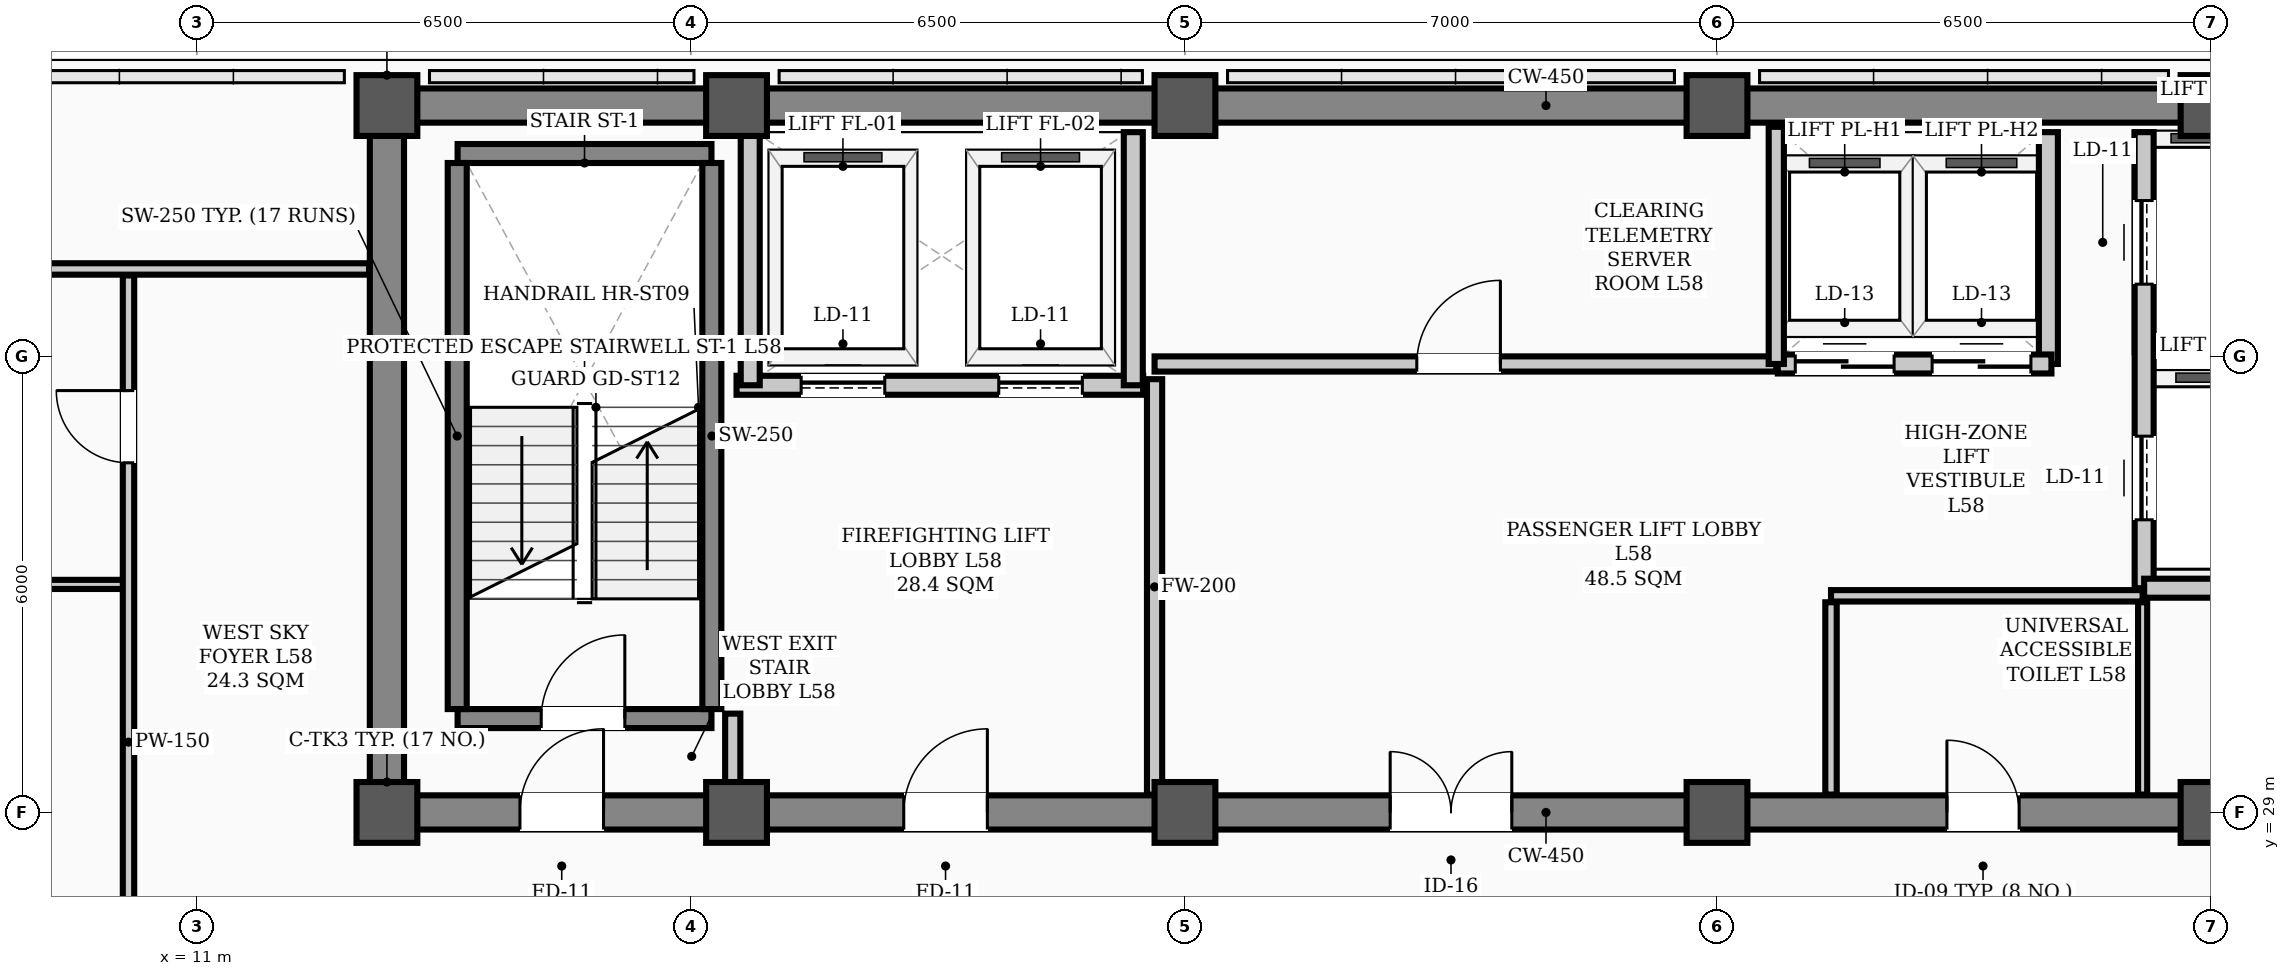
"""IFC4 building model, lengths in metres.
Left out: names, types, materials, properties, quantities, classifications, styles, units other than length and angle.
Written with IfcOpenShell. Run it as: python <this file> out.ifc"""

import sys

from ifc_helpers import new_model, si_unit, direction, frame, frame_2d, origin, origin_2d, place, context, subcontext, project, spatial, rectangle, hollow_rectangle, extrude, element, fill, save


model = new_model("IFC4")
c1 = context("Model", 3, precision=1e-05, world=origin(), true_north=direction((0.0, 1.0)))
c2 = subcontext(c1, "Body", "Model", "MODEL_VIEW")
j1 = project(units=[si_unit("LENGTHUNIT", "METRE"), si_unit("PLANEANGLEUNIT", "RADIAN")], contexts=[c1])
p1 = place(None, origin())
s1 = spatial("IfcSite", under=j1, at=p1, CompositionType="ELEMENT")
p2 = place(p1, origin())
s2 = spatial("IfcBuilding", under=s1, at=p2, CompositionType="ELEMENT")
p3 = place(p2, frame((0.0, 0.0, 234.5)))
s3 = spatial("IfcBuildingStorey", under=s2, at=p3, CompositionType="ELEMENT", Elevation=234.5)
for number, where, z_axis, x_axis in (
    (1, (13.5, 29.0, 0.0), (0.0, 0.0, 1.0), (1.0, 0.0, 0.0)),
    (2, (13.5, 38.3, 0.0), (0.0, 0.0, 1.0), (1.0, 0.0, 0.0)),
    (3, (18.1, 29.0, 0.0), (0.0, 0.0, 1.0), (1.0, 0.0, 0.0)),
    (4, (18.1, 38.3, 0.0), (0.0, 0.0, 1.0), (1.0, 0.0, 0.0)),
    (5, (24.0, 29.0, 0.0), (0.0, 0.0, 1.0), (1.0, 0.0, 0.0)),
    (6, (24.0, 38.3, 0.0), (0.0, 0.0, 1.0), (1.0, 0.0, 0.0)),
    (7, (31.0, 29.0, 0.0), (0.0, 0.0, 1.0), (1.0, 0.0, 0.0)),
    (8, (31.0, 38.3, 0.0), (0.0, 0.0, 1.0), (1.0, 0.0, 0.0)),
    (9, (37.5, 29.0, 0.0), (0.0, 0.0, 1.0), (1.0, 0.0, 0.0)),
    (10, (37.5, 38.3, 0.0), (0.0, 0.0, 1.0), (1.0, 0.0, 0.0)),
):
    element("IfcColumn", number, at=place(p3, frame(where, z_axis=z_axis, x_axis=x_axis)), inside=s3, PredefinedType="COLUMN", context=c2, shape_type="SweptSolid", body=[
        extrude(hollow_rectangle(XDim=0.8, YDim=0.8, WallThickness=0.032, InnerFilletRadius=0.016, OuterFilletRadius=0.048, at=origin_2d()), origin(), (0.0, 0.0, 1.0), 3.9),
    ])
p4 = place(p3, frame((13.5, 29.0, 0.0), z_axis=(0.0, 0.0, 1.0), x_axis=(1.0, 0.0, 0.0)))
e11 = element("IfcWall", 11, at=p4, inside=s3, PredefinedType="SHEAR", context=c2, shape_type="SweptSolid", body=[
    extrude(rectangle(XDim=30.5, YDim=0.45, at=frame_2d((15.25, 0.0))), origin(), (0.0, 0.0, 1.0), 3.72),
])
p5 = place(p4, frame((1.75, 0.0, 0.0)))
e12 = element("IfcOpeningElement", 12, at=p5, cuts=e11, PredefinedType="OPENING", context=c2, shape_type="SweptSolid", body=[
    extrude(rectangle(XDim=1.1, YDim=2.08, at=frame_2d((0.55, 1.04))), frame((0.0, 0.235, 0.0), z_axis=(0.0, -1.0, 0.0), x_axis=(1.0, 0.0, 0.0)), (0.0, 0.0, 1.0), 0.47),
])
p6 = place(p4, frame((26.7, 0.0, 0.0)))
e13 = element("IfcOpeningElement", 13, at=p6, cuts=e11, PredefinedType="OPENING", context=c2, shape_type="SweptSolid", body=[
    extrude(rectangle(XDim=1.1, YDim=2.08, at=frame_2d((0.55, 1.04))), frame((0.0, 0.235, 0.0), z_axis=(0.0, -1.0, 0.0), x_axis=(1.0, 0.0, 0.0)), (0.0, 0.0, 1.0), 0.47),
])
p7 = place(p4, frame((6.8, 0.0, 0.0)))
e14 = element("IfcOpeningElement", 14, at=p7, cuts=e11, PredefinedType="OPENING", context=c2, shape_type="SweptSolid", body=[
    extrude(rectangle(XDim=1.1, YDim=2.08, at=frame_2d((0.55, 1.04))), frame((0.0, 0.235, 0.0), z_axis=(0.0, -1.0, 0.0), x_axis=(1.0, 0.0, 0.0)), (0.0, 0.0, 1.0), 0.47),
])
p8 = place(p4, frame((13.2, 0.0, 0.0)))
e15 = element("IfcOpeningElement", 15, at=p8, cuts=e11, PredefinedType="OPENING", context=c2, shape_type="SweptSolid", body=[
    extrude(rectangle(XDim=1.6, YDim=2.08, at=frame_2d((0.8, 1.04))), frame((0.0, 0.235, 0.0), z_axis=(0.0, -1.0, 0.0), x_axis=(1.0, 0.0, 0.0)), (0.0, 0.0, 1.0), 0.47),
])
p9 = place(p4, frame((20.525, 0.0, 0.0)))
e16 = element("IfcOpeningElement", 16, at=p9, cuts=e11, PredefinedType="OPENING", context=c2, shape_type="SweptSolid", body=[
    extrude(rectangle(XDim=0.95, YDim=2.08, at=frame_2d((0.475, 1.04))), frame((0.0, 0.235, 0.0), z_axis=(0.0, -1.0, 0.0), x_axis=(1.0, 0.0, 0.0)), (0.0, 0.0, 1.0), 0.47),
])
p10 = place(p3, frame((13.5, 38.3, 0.0), z_axis=(0.0, 0.0, 1.0), x_axis=(1.0, 0.0, 0.0)))
e17 = element("IfcWall", 17, at=p10, inside=s3, PredefinedType="SHEAR", context=c2, shape_type="SweptSolid", body=[
    extrude(rectangle(XDim=30.5, YDim=0.45, at=frame_2d((15.25, 0.0))), origin(), (0.0, 0.0, 1.0), 3.72),
])
p11 = place(p3, frame((13.5, 29.35, 0.0), z_axis=(0.0, 0.0, 1.0), x_axis=(0.0, 1.0, 0.0)))
e18 = element("IfcWall", 18, at=p11, inside=s3, PredefinedType="SHEAR", context=c2, shape_type="SweptSolid", body=[
    extrude(rectangle(XDim=8.6, YDim=0.45, at=frame_2d((4.3, 0.0))), origin(), (0.0, 0.0, 1.0), 3.72),
])
p12 = place(p3, frame((14.43, 30.235, 0.0), z_axis=(0.0, 0.0, 1.0), x_axis=(1.0, 0.0, 0.0)))
e19 = element("IfcWall", 19, at=p12, inside=s3, PredefinedType="STANDARD", context=c2, shape_type="SweptSolid", body=[
    extrude(rectangle(XDim=3.34, YDim=0.25, at=frame_2d((1.67, 0.0))), origin(), (0.0, 0.0, 1.0), 3.72),
])
p13 = place(p12, frame((1.1, 0.0, 0.0)))
e20 = element("IfcOpeningElement", 20, at=p13, cuts=e19, PredefinedType="OPENING", context=c2, shape_type="SweptSolid", body=[
    extrude(rectangle(XDim=1.1, YDim=2.08, at=frame_2d((0.55, 1.04))), frame((0.0, 0.135, 0.0), z_axis=(0.0, -1.0, 0.0), x_axis=(1.0, 0.0, 0.0)), (0.0, 0.0, 1.0), 0.27),
])
p14 = place(p3, frame((14.43, 37.669, 0.0), z_axis=(0.0, 0.0, 1.0), x_axis=(1.0, 0.0, 0.0)))
e21 = element("IfcWall", 21, at=p14, inside=s3, PredefinedType="STANDARD", context=c2, shape_type="SweptSolid", body=[
    extrude(rectangle(XDim=3.34, YDim=0.25, at=frame_2d((1.67, 0.0))), origin(), (0.0, 0.0, 1.0), 3.72),
])
for number, where, z_axis, x_axis in (
    (22, (14.425, 30.36, 0.0), (0.0, 0.0, 1.0), (0.0, 1.0, 0.0)),
    (23, (17.775, 30.36, 0.0), (0.0, 0.0, 1.0), (0.0, 1.0, 0.0)),
):
    element("IfcWall", number, at=place(p3, frame(where, z_axis=z_axis, x_axis=x_axis)), inside=s3, PredefinedType="STANDARD", context=c2, shape_type="SweptSolid", body=[
        extrude(rectangle(XDim=7.184, YDim=0.25, at=frame_2d((3.592, 0.0))), origin(), (0.0, 0.0, 1.0), 3.72),
    ])
p15 = place(p3, frame((18.1, 34.62, 0.0), z_axis=(0.0, 0.0, 1.0), x_axis=(1.0, 0.0, 0.0)))
e24 = element("IfcWall", 24, at=p15, inside=s3, PredefinedType="STANDARD", context=c2, shape_type="SweptSolid", body=[
    extrude(rectangle(XDim=5.35, YDim=0.25, at=frame_2d((2.675, 0.0))), origin(), (0.0, 0.0, 1.0), 3.72),
])
p16 = place(p15, frame((0.85, 0.0, 0.0)))
e25 = element("IfcOpeningElement", 25, at=p16, cuts=e24, PredefinedType="OPENING", context=c2, shape_type="SweptSolid", body=[
    extrude(rectangle(XDim=1.1, YDim=2.08, at=frame_2d((0.55, 1.04))), frame((0.0, 0.135, 0.0), z_axis=(0.0, -1.0, 0.0), x_axis=(1.0, 0.0, 0.0)), (0.0, 0.0, 1.0), 0.27),
])
p17 = place(p15, frame((3.45, 0.0, 0.0)))
e26 = element("IfcOpeningElement", 26, at=p17, cuts=e24, PredefinedType="OPENING", context=c2, shape_type="SweptSolid", body=[
    extrude(rectangle(XDim=1.1, YDim=2.08, at=frame_2d((0.55, 1.04))), frame((0.0, 0.135, 0.0), z_axis=(0.0, -1.0, 0.0), x_axis=(1.0, 0.0, 0.0)), (0.0, 0.0, 1.0), 0.27),
])
p18 = place(p3, frame((36.62, 31.95, 0.0), z_axis=(0.0, 0.0, 1.0), x_axis=(0.0, 1.0, 0.0)))
e27 = element("IfcWall", 27, at=p18, inside=s3, PredefinedType="STANDARD", context=c2, shape_type="SweptSolid", body=[
    extrude(rectangle(XDim=6.0, YDim=0.25, at=frame_2d((3.0, 0.0))), origin(), (0.0, 0.0, 1.0), 3.72),
])
p19 = place(p18, frame((0.9, 0.0, 0.0)))
e28 = element("IfcOpeningElement", 28, at=p19, cuts=e27, PredefinedType="OPENING", context=c2, shape_type="SweptSolid", body=[
    extrude(rectangle(XDim=1.1, YDim=2.08, at=frame_2d((0.55, 1.04))), frame((0.0, 0.135, 0.0), z_axis=(0.0, -1.0, 0.0), x_axis=(1.0, 0.0, 0.0)), (0.0, 0.0, 1.0), 0.27),
])
p20 = place(p18, frame((4.0, 0.0, 0.0)))
e29 = element("IfcOpeningElement", 29, at=p20, cuts=e27, PredefinedType="OPENING", context=c2, shape_type="SweptSolid", body=[
    extrude(rectangle(XDim=1.1, YDim=2.08, at=frame_2d((0.55, 1.04))), frame((0.0, 0.135, 0.0), z_axis=(0.0, -1.0, 0.0), x_axis=(1.0, 0.0, 0.0)), (0.0, 0.0, 1.0), 0.27),
])
p21 = place(p3, frame((36.62, 31.95, 0.0), z_axis=(0.0, 0.0, 1.0), x_axis=(1.0, 0.0, 0.0)))
e30 = element("IfcWall", 30, at=p21, inside=s3, PredefinedType="STANDARD", context=c2, shape_type="SweptSolid", body=[
    extrude(rectangle(XDim=1.9, YDim=0.25, at=frame_2d((0.95, 0.0))), origin(), (0.0, 0.0, 1.0), 3.48),
])
for number, where, z_axis, x_axis in (
    (31, (18.28, 34.62, 0.0), (0.0, 0.0, 1.0), (0.0, 1.0, 0.0)),
    (32, (23.32, 34.62, 0.0), (0.0, 0.0, 1.0), (0.0, 1.0, 0.0)),
):
    element("IfcWall", number, at=place(p3, frame(where, z_axis=z_axis, x_axis=x_axis)), inside=s3, PredefinedType="STANDARD", context=c2, shape_type="SweptSolid", body=[
        extrude(rectangle(XDim=3.33, YDim=0.25, at=frame_2d((1.665, 0.0))), origin(), (0.0, 0.0, 1.0), 3.72),
    ])
p22 = place(p3, frame((35.36, 34.9, 0.0), z_axis=(0.0, 0.0, 1.0), x_axis=(0.0, 1.0, 0.0)))
e33 = element("IfcWall", 33, at=p22, inside=s3, PredefinedType="STANDARD", context=c2, shape_type="SweptSolid", body=[
    extrude(rectangle(XDim=3.05, YDim=0.25, at=frame_2d((1.525, 0.0))), origin(), (0.0, 0.0, 1.0), 3.72),
])
p23 = place(p3, frame((31.8, 34.9, 0.0), z_axis=(0.0, 0.0, 1.0), x_axis=(1.0, 0.0, 0.0)))
e34 = element("IfcWall", 34, at=p23, inside=s3, PredefinedType="STANDARD", context=c2, shape_type="SweptSolid", body=[
    extrude(rectangle(XDim=3.6, YDim=0.25, at=frame_2d((1.8, 0.0))), origin(), (0.0, 0.0, 1.0), 3.72),
])
p24 = place(p23, frame((0.23, 0.0, 0.0)))
e35 = element("IfcOpeningElement", 35, at=p24, cuts=e34, PredefinedType="OPENING", context=c2, shape_type="SweptSolid", body=[
    extrude(rectangle(XDim=1.3, YDim=2.08, at=frame_2d((0.65, 1.04))), frame((0.0, 0.135, 0.0), z_axis=(0.0, -1.0, 0.0), x_axis=(1.0, 0.0, 0.0)), (0.0, 0.0, 1.0), 0.27),
])
p25 = place(p23, frame((2.03, 0.0, 0.0)))
e36 = element("IfcOpeningElement", 36, at=p25, cuts=e34, PredefinedType="OPENING", context=c2, shape_type="SweptSolid", body=[
    extrude(rectangle(XDim=1.3, YDim=2.08, at=frame_2d((0.65, 1.04))), frame((0.0, 0.135, 0.0), z_axis=(0.0, -1.0, 0.0), x_axis=(1.0, 0.0, 0.0)), (0.0, 0.0, 1.0), 0.27),
])
p26 = place(p3, frame((23.6, 34.9, 0.0), z_axis=(0.0, 0.0, 1.0), x_axis=(1.0, 0.0, 0.0)))
e37 = element("IfcWall", 37, at=p26, inside=s3, PredefinedType="STANDARD", context=c2, shape_type="SweptSolid", body=[
    extrude(rectangle(XDim=8.18, YDim=0.2, at=frame_2d((4.09, 0.0))), origin(), (0.0, 0.0, 1.0), 3.72),
])
p27 = place(p26, frame((3.45, 0.0, 0.0)))
e38 = element("IfcOpeningElement", 38, at=p27, cuts=e37, PredefinedType="OPENING", context=c2, shape_type="SweptSolid", body=[
    extrude(rectangle(XDim=1.1, YDim=2.08, at=frame_2d((0.55, 1.04))), frame((0.0, 0.11, 0.0), z_axis=(0.0, -1.0, 0.0), x_axis=(1.0, 0.0, 0.0)), (0.0, 0.0, 1.0), 0.22),
])
p28 = place(p3, frame((32.5, 31.85, 0.0), z_axis=(0.0, 0.0, 1.0), x_axis=(1.0, 0.0, 0.0)))
e39 = element("IfcWall", 39, at=p28, inside=s3, PredefinedType="PARTITIONING", context=c2, shape_type="SweptSolid", body=[
    extrude(rectangle(XDim=4.1, YDim=0.15, at=frame_2d((2.05, 0.0))), origin(), (0.0, 0.0, 1.0), 3.72),
])
p29 = place(p3, frame((4.81, 36.15, 0.0), z_axis=(0.0, 0.0, 1.0), x_axis=(1.0, 0.0, 0.0)))
e40 = element("IfcWall", 40, at=p29, inside=s3, PredefinedType="PARTITIONING", context=c2, shape_type="SweptSolid", body=[
    extrude(rectangle(XDim=8.455, YDim=0.15, at=frame_2d((4.228, 0.0))), origin(), (0.0, 0.0, 1.0), 3.2),
])
p30 = place(p3, frame((4.81, 32.0, 0.0), z_axis=(0.0, 0.0, 1.0), x_axis=(1.0, 0.0, 0.0)))
e41 = element("IfcWall", 41, at=p30, inside=s3, PredefinedType="PARTITIONING", context=c2, shape_type="SweptSolid", body=[
    extrude(rectangle(XDim=5.29, YDim=0.12, at=frame_2d((2.645, 0.0))), origin(), (0.0, 0.0, 1.0), 3.72),
])
p31 = place(p3, frame((18.05, 29.235, 0.0), z_axis=(0.0, 0.0, 1.0), x_axis=(0.0, 1.0, 0.0)))
e42 = element("IfcWall", 42, at=p31, inside=s3, PredefinedType="STANDARD", context=c2, shape_type="SweptSolid", body=[
    extrude(rectangle(XDim=1.065, YDim=0.2, at=frame_2d((0.532, 0.0))), origin(), (0.0, 0.0, 1.0), 3.35),
])
p32 = place(p3, frame((23.6, 29.235, 0.0), z_axis=(0.0, 0.0, 1.0), x_axis=(0.0, 1.0, 0.0)))
e43 = element("IfcWall", 43, at=p32, inside=s3, PredefinedType="STANDARD", context=c2, shape_type="SweptSolid", body=[
    extrude(rectangle(XDim=5.465, YDim=0.2, at=frame_2d((2.732, 0.0))), origin(), (0.0, 0.0, 1.0), 3.2),
])
p33 = place(p3, frame((32.5, 29.235, 0.0), z_axis=(0.0, 0.0, 1.0), x_axis=(0.0, 1.0, 0.0)))
e44 = element("IfcWall", 44, at=p33, inside=s3, PredefinedType="PARTITIONING", context=c2, shape_type="SweptSolid", body=[
    extrude(rectangle(XDim=2.53, YDim=0.15, at=frame_2d((1.265, 0.0))), origin(), (0.0, 0.0, 1.0), 3.35),
])
p34 = place(p3, frame((36.6, 29.235, 0.0), z_axis=(0.0, 0.0, 1.0), x_axis=(0.0, 1.0, 0.0)))
e45 = element("IfcWall", 45, at=p34, inside=s3, PredefinedType="PARTITIONING", context=c2, shape_type="SweptSolid", body=[
    extrude(rectangle(XDim=2.53, YDim=0.12, at=frame_2d((1.265, 0.0))), origin(), (0.0, 0.0, 1.0), 3.35),
])
p35 = place(p3, frame((10.1, 23.785, 0.0), z_axis=(0.0, 0.0, 1.0), x_axis=(0.0, 1.0, 0.0)))
e46 = element("IfcWall", 46, at=p35, inside=s3, PredefinedType="PARTITIONING", context=c2, shape_type="SweptSolid", body=[
    extrude(rectangle(XDim=12.28, YDim=0.15, at=frame_2d((6.14, 0.0))), origin(), (0.0, 0.0, 1.0), 3.1),
])
p36 = place(p35, frame((0.64, 0.0, 0.0)))
e47 = element("IfcOpeningElement", 47, at=p36, cuts=e46, PredefinedType="OPENING", context=c2, shape_type="SweptSolid", body=[
    extrude(rectangle(XDim=0.95, YDim=2.08, at=frame_2d((0.475, 1.04))), frame((0.0, 0.085, 0.0), z_axis=(0.0, -1.0, 0.0), x_axis=(1.0, 0.0, 0.0)), (0.0, 0.0, 1.0), 0.17),
])
p37 = place(p35, frame((9.815, 0.0, 0.0)))
e48 = element("IfcOpeningElement", 48, at=p37, cuts=e46, PredefinedType="OPENING", context=c2, shape_type="SweptSolid", body=[
    extrude(rectangle(XDim=0.95, YDim=2.08, at=frame_2d((0.475, 1.04))), frame((0.0, 0.085, 0.0), z_axis=(0.0, -1.0, 0.0), x_axis=(1.0, 0.0, 0.0)), (0.0, 0.0, 1.0), 0.17),
])
p38 = place(p3, frame((31.78, 34.9, 0.0), z_axis=(0.0, 0.0, 1.0), x_axis=(0.0, 1.0, 0.0)))
e49 = element("IfcWall", 49, at=p38, inside=s3, PredefinedType="STANDARD", context=c2, shape_type="SweptSolid", body=[
    extrude(rectangle(XDim=3.12, YDim=0.2, at=frame_2d((1.56, 0.0))), origin(), (0.0, 0.0, 1.0), 3.72),
])
p39 = place(p13, origin())
e50 = element("IfcDoor", 50, at=p39, inside=s3, OperationType="SINGLE_SWING_RIGHT", PredefinedType="DOOR", context=c2, shape_type="SweptSolid", body=[
    extrude(rectangle(XDim=1.1, YDim=2.08, at=frame_2d((0.55, 1.04))), frame((0.0, 0.025, 0.0), z_axis=(0.0, -1.0, 0.0), x_axis=(1.0, 0.0, 0.0)), (0.0, 0.0, 1.0), 0.05),
])
fill(e20, e50)
p40 = place(p5, origin())
e51 = element("IfcDoor", 51, at=p40, inside=s3, OperationType="SINGLE_SWING_RIGHT", PredefinedType="DOOR", context=c2, shape_type="SweptSolid", body=[
    extrude(rectangle(XDim=1.1, YDim=2.08, at=frame_2d((0.55, 1.04))), frame((0.0, 0.025, 0.0), z_axis=(0.0, -1.0, 0.0), x_axis=(1.0, 0.0, 0.0)), (0.0, 0.0, 1.0), 0.05),
])
fill(e12, e51)
p41 = place(p7, origin())
e52 = element("IfcDoor", 52, at=p41, inside=s3, OperationType="SINGLE_SWING_RIGHT", PredefinedType="DOOR", context=c2, shape_type="SweptSolid", body=[
    extrude(rectangle(XDim=1.1, YDim=2.08, at=frame_2d((0.55, 1.04))), frame((0.0, 0.025, 0.0), z_axis=(0.0, -1.0, 0.0), x_axis=(1.0, 0.0, 0.0)), (0.0, 0.0, 1.0), 0.05),
])
fill(e14, e52)
p42 = place(p8, origin())
e53 = element("IfcDoor", 53, at=p42, inside=s3, OperationType="DOUBLE_DOOR_SINGLE_SWING", PredefinedType="DOOR", context=c2, shape_type="SweptSolid", body=[
    extrude(rectangle(XDim=1.6, YDim=2.08, at=frame_2d((0.8, 1.04))), frame((0.0, 0.025, 0.0), z_axis=(0.0, -1.0, 0.0), x_axis=(1.0, 0.0, 0.0)), (0.0, 0.0, 1.0), 0.05),
])
fill(e15, e53)
p43 = place(p27, origin())
e54 = element("IfcDoor", 54, at=p43, inside=s3, OperationType="SINGLE_SWING_RIGHT", PredefinedType="DOOR", context=c2, shape_type="SweptSolid", body=[
    extrude(rectangle(XDim=1.1, YDim=2.08, at=frame_2d((0.55, 1.04))), frame((0.0, 0.025, 0.0), z_axis=(0.0, -1.0, 0.0), x_axis=(1.0, 0.0, 0.0)), (0.0, 0.0, 1.0), 0.05),
])
fill(e38, e54)
p44 = place(p9, origin())
e55 = element("IfcDoor", 55, at=p44, inside=s3, OperationType="SINGLE_SWING_LEFT", PredefinedType="DOOR", context=c2, shape_type="SweptSolid", body=[
    extrude(rectangle(XDim=0.95, YDim=2.08, at=frame_2d((0.475, 1.04))), frame((0.0, 0.025, 0.0), z_axis=(0.0, -1.0, 0.0), x_axis=(1.0, 0.0, 0.0)), (0.0, 0.0, 1.0), 0.05),
])
fill(e16, e55)
p45 = place(p37, origin())
e56 = element("IfcDoor", 56, at=p45, inside=s3, OperationType="SINGLE_SWING_RIGHT", PredefinedType="DOOR", context=c2, shape_type="SweptSolid", body=[
    extrude(rectangle(XDim=0.95, YDim=2.08, at=frame_2d((0.475, 1.04))), frame((0.0, 0.025, 0.0), z_axis=(0.0, -1.0, 0.0), x_axis=(1.0, 0.0, 0.0)), (0.0, 0.0, 1.0), 0.05),
])
fill(e48, e56)
p46 = place(p16, origin())
e57 = element("IfcDoor", 57, at=p46, inside=s3, OperationType="SLIDING_TO_LEFT", PredefinedType="DOOR", context=c2, shape_type="SweptSolid", body=[
    extrude(rectangle(XDim=1.1, YDim=2.08, at=frame_2d((0.55, 1.04))), frame((0.0, 0.025, 0.0), z_axis=(0.0, -1.0, 0.0), x_axis=(1.0, 0.0, 0.0)), (0.0, 0.0, 1.0), 0.05),
])
fill(e25, e57)
p47 = place(p17, origin())
e58 = element("IfcDoor", 58, at=p47, inside=s3, OperationType="SLIDING_TO_LEFT", PredefinedType="DOOR", context=c2, shape_type="SweptSolid", body=[
    extrude(rectangle(XDim=1.1, YDim=2.08, at=frame_2d((0.55, 1.04))), frame((0.0, 0.025, 0.0), z_axis=(0.0, -1.0, 0.0), x_axis=(1.0, 0.0, 0.0)), (0.0, 0.0, 1.0), 0.05),
])
fill(e26, e58)
p48 = place(p19, origin())
e59 = element("IfcDoor", 59, at=p48, inside=s3, OperationType="SLIDING_TO_LEFT", PredefinedType="DOOR", context=c2, shape_type="SweptSolid", body=[
    extrude(rectangle(XDim=1.1, YDim=2.08, at=frame_2d((0.55, 1.04))), frame((0.0, 0.025, 0.0), z_axis=(0.0, -1.0, 0.0), x_axis=(1.0, 0.0, 0.0)), (0.0, 0.0, 1.0), 0.05),
])
fill(e28, e59)
p49 = place(p20, origin())
e60 = element("IfcDoor", 60, at=p49, inside=s3, OperationType="SLIDING_TO_LEFT", PredefinedType="DOOR", context=c2, shape_type="SweptSolid", body=[
    extrude(rectangle(XDim=1.1, YDim=2.08, at=frame_2d((0.55, 1.04))), frame((0.0, 0.025, 0.0), z_axis=(0.0, -1.0, 0.0), x_axis=(1.0, 0.0, 0.0)), (0.0, 0.0, 1.0), 0.05),
])
fill(e29, e60)
p50 = place(p24, origin())
e61 = element("IfcDoor", 61, at=p50, inside=s3, OperationType="DOUBLE_DOOR_SLIDING", PredefinedType="DOOR", context=c2, shape_type="SweptSolid", body=[
    extrude(rectangle(XDim=1.3, YDim=2.08, at=frame_2d((0.65, 1.04))), frame((0.0, 0.025, 0.0), z_axis=(0.0, -1.0, 0.0), x_axis=(1.0, 0.0, 0.0)), (0.0, 0.0, 1.0), 0.05),
])
fill(e35, e61)
p51 = place(p25, origin())
e62 = element("IfcDoor", 62, at=p51, inside=s3, OperationType="DOUBLE_DOOR_SLIDING", PredefinedType="DOOR", context=c2, shape_type="SweptSolid", body=[
    extrude(rectangle(XDim=1.3, YDim=2.08, at=frame_2d((0.65, 1.04))), frame((0.0, 0.025, 0.0), z_axis=(0.0, -1.0, 0.0), x_axis=(1.0, 0.0, 0.0)), (0.0, 0.0, 1.0), 0.05),
])
fill(e36, e62)
save(model, sys.argv[1])
